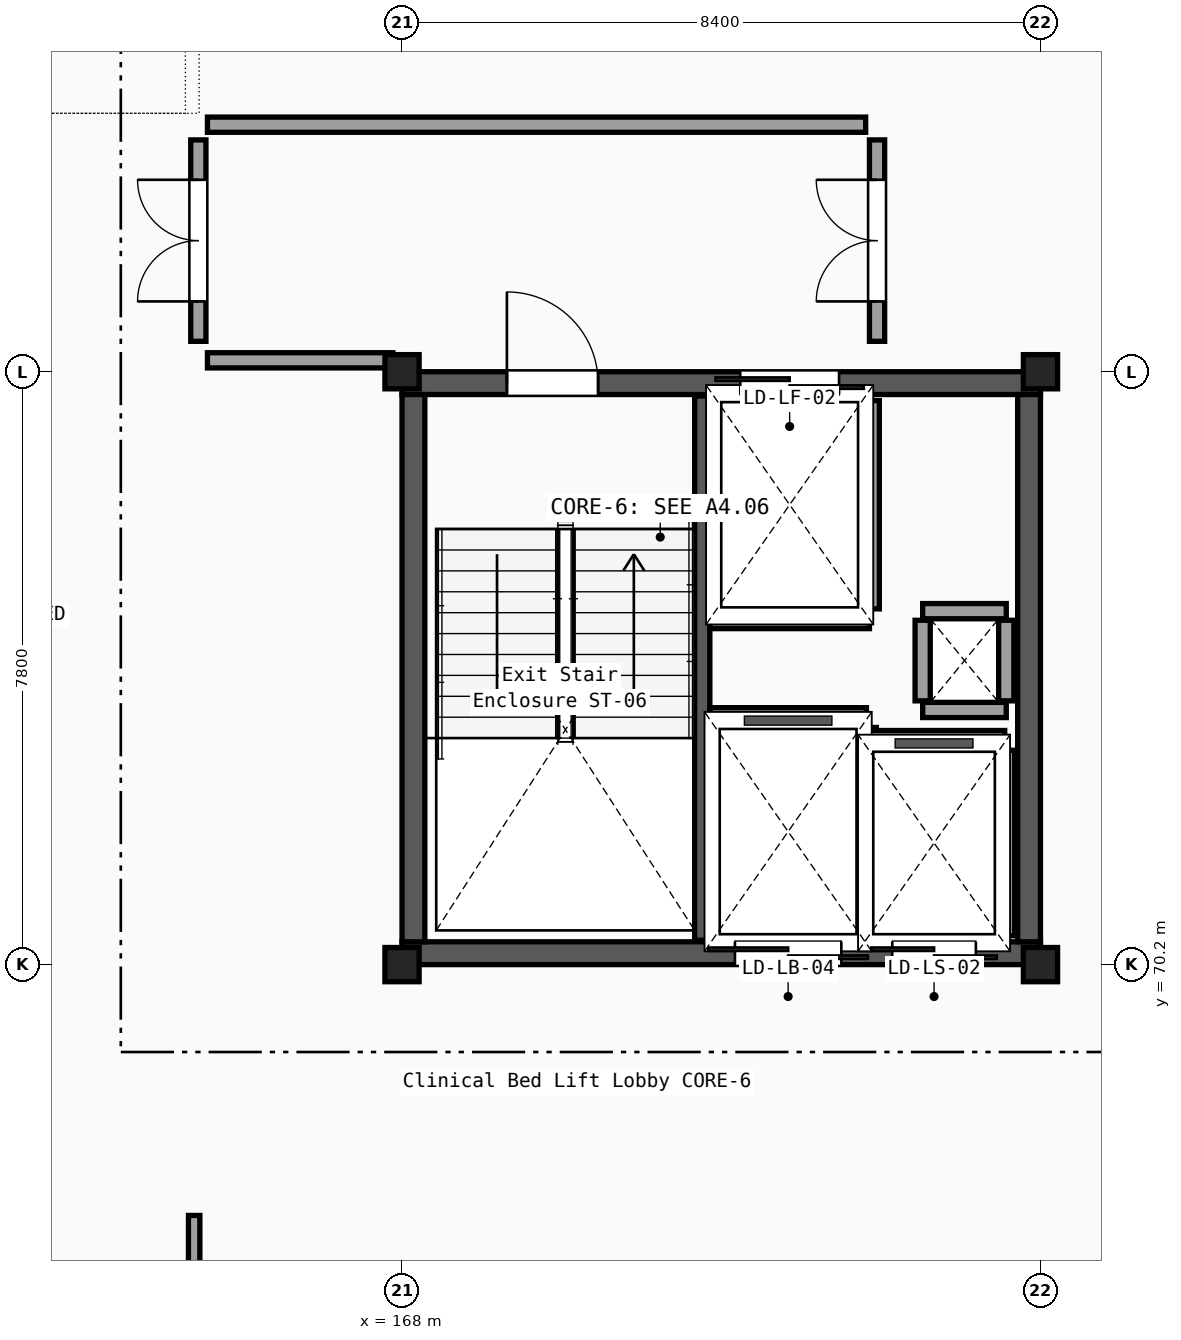
"""IFC4 building model, lengths in metres.
Left out: names, types, materials, properties, quantities, classifications, styles, units other than length and angle.
Written with IfcOpenShell. Run it as: python <this file> out.ifc"""

import sys

from ifc_helpers import new_model, si_unit, direction, frame, frame_2d, origin, origin_2d, place, context, subcontext, project, spatial, rectangle, i_section, extrude, element, fill, save


model = new_model("IFC4")
c1 = context("Model", 3, precision=1e-05, world=origin(), true_north=direction((0.0, 1.0)))
c2 = subcontext(c1, "Body", "Model", "MODEL_VIEW")
j1 = project(units=[si_unit("LENGTHUNIT", "METRE"), si_unit("PLANEANGLEUNIT", "RADIAN")], contexts=[c1])
p1 = place(None, origin())
s1 = spatial("IfcSite", under=j1, at=p1, CompositionType="ELEMENT")
p2 = place(p1, origin())
s2 = spatial("IfcBuilding", under=s1, at=p2, CompositionType="ELEMENT")
p3 = place(p2, frame((0.0, 0.0, 22.95)))
s3 = spatial("IfcBuildingStorey", under=s2, at=p3, CompositionType="ELEMENT", Elevation=22.95)
for number, where, z_axis, x_axis in (
    (1, (168.0, 70.2, 0.0), (0.0, 0.0, 1.0), (1.0, 0.0, 0.0)),
    (2, (168.0, 78.0, 0.0), (0.0, 0.0, 1.0), (1.0, 0.0, 0.0)),
    (3, (176.4, 70.2, 0.0), (0.0, 0.0, 1.0), (1.0, 0.0, 0.0)),
    (4, (176.4, 78.0, 0.0), (0.0, 0.0, 1.0), (1.0, 0.0, 0.0)),
):
    element("IfcColumn", number, at=place(p3, frame(where, z_axis=z_axis, x_axis=x_axis)), inside=s3, PredefinedType="COLUMN", context=c2, shape_type="SweptSolid", body=[
        extrude(i_section(OverallWidth=0.3, OverallDepth=0.45, WebThickness=0.014, FlangeThickness=0.026, FilletRadius=0.027, at=origin_2d()), origin(), (0.0, 0.0, 1.0), 4.05),
    ])
p4 = place(p3, frame((168.0, 70.35, 0.0), z_axis=(0.0, 0.0, 1.0), x_axis=(1.0, 0.0, 0.0)))
e5 = element("IfcWall", 5, at=p4, inside=s3, PredefinedType="SHEAR", context=c2, shape_type="SweptSolid", body=[
    extrude(rectangle(XDim=8.4, YDim=0.3, at=frame_2d((4.2, 0.0))), origin(), (0.0, 0.0, 1.0), 3.82),
])
p5 = place(p4, frame((4.38, 0.0, 0.0)))
e6 = element("IfcOpeningElement", 6, at=p5, cuts=e5, PredefinedType="OPENING", context=c2, shape_type="SweptSolid", body=[
    extrude(rectangle(XDim=1.4, YDim=2.2, at=frame_2d((0.7, 1.1))), frame((0.0, 0.16, 0.0), z_axis=(0.0, -1.0, 0.0), x_axis=(1.0, 0.0, 0.0)), (0.0, 0.0, 1.0), 0.32),
])
p6 = place(p4, frame((6.45, 0.0, 0.0)))
e7 = element("IfcOpeningElement", 7, at=p6, cuts=e5, PredefinedType="OPENING", context=c2, shape_type="SweptSolid", body=[
    extrude(rectangle(XDim=1.1, YDim=2.15, at=frame_2d((0.55, 1.075))), frame((0.0, 0.16, 0.0), z_axis=(0.0, -1.0, 0.0), x_axis=(1.0, 0.0, 0.0)), (0.0, 0.0, 1.0), 0.32),
])
p7 = place(p3, frame((168.0, 77.85, 0.0), z_axis=(0.0, 0.0, 1.0), x_axis=(1.0, 0.0, 0.0)))
e8 = element("IfcWall", 8, at=p7, inside=s3, PredefinedType="SHEAR", context=c2, shape_type="SweptSolid", body=[
    extrude(rectangle(XDim=8.4, YDim=0.3, at=frame_2d((4.2, 0.0))), origin(), (0.0, 0.0, 1.0), 3.82),
])
p8 = place(p7, frame((1.38, 0.0, 0.0)))
e9 = element("IfcOpeningElement", 9, at=p8, cuts=e8, PredefinedType="OPENING", context=c2, shape_type="SweptSolid", body=[
    extrude(rectangle(XDim=1.2, YDim=2.15, at=frame_2d((0.6, 1.075))), frame((0.0, 0.16, 0.0), z_axis=(0.0, -1.0, 0.0), x_axis=(1.0, 0.0, 0.0)), (0.0, 0.0, 1.0), 0.32),
])
p9 = place(p7, frame((4.45, 0.0, 0.0)))
e10 = element("IfcOpeningElement", 10, at=p9, cuts=e8, PredefinedType="OPENING", context=c2, shape_type="SweptSolid", body=[
    extrude(rectangle(XDim=1.3, YDim=2.2, at=frame_2d((0.65, 1.1))), frame((0.0, 0.16, 0.0), z_axis=(0.0, -1.0, 0.0), x_axis=(1.0, 0.0, 0.0)), (0.0, 0.0, 1.0), 0.32),
])
for number, where, z_axis, x_axis in (
    (11, (168.15, 70.5, 0.0), (0.0, 0.0, 1.0), (0.0, 1.0, 0.0)),
    (12, (176.25, 70.5, 0.0), (0.0, 0.0, 1.0), (0.0, 1.0, 0.0)),
):
    element("IfcWall", number, at=place(p3, frame(where, z_axis=z_axis, x_axis=x_axis)), inside=s3, PredefinedType="SHEAR", context=c2, shape_type="SweptSolid", body=[
        extrude(rectangle(XDim=7.2, YDim=0.3, at=frame_2d((3.6, 0.0))), origin(), (0.0, 0.0, 1.0), 3.82),
    ])
p10 = place(p3, frame((171.95, 70.52, 0.0), z_axis=(0.0, 0.0, 1.0), x_axis=(0.0, 1.0, 0.0)))
e13 = element("IfcWall", 13, at=p10, inside=s3, PredefinedType="SHEAR", context=c2, shape_type="SweptSolid", body=[
    extrude(rectangle(XDim=7.16, YDim=0.2, at=frame_2d((3.58, 0.0))), origin(), (0.0, 0.0, 1.0), 3.82),
])
for number, where, z_axis, x_axis in (
    (14, (174.85, 73.55, 0.0), (0.0, 0.0, 1.0), (1.0, 0.0, 0.0)),
    (15, (174.85, 74.85, 0.0), (0.0, 0.0, 1.0), (1.0, 0.0, 0.0)),
):
    element("IfcWall", number, at=place(p3, frame(where, z_axis=z_axis, x_axis=x_axis)), inside=s3, PredefinedType="PARTITIONING", context=c2, shape_type="SweptSolid", body=[
        extrude(rectangle(XDim=1.1, YDim=0.2, at=frame_2d((0.55, 0.0))), origin(), (0.0, 0.0, 1.0), 3.25),
    ])
for number, where, z_axis, x_axis in (
    (16, (174.85, 73.67, 0.0), (0.0, 0.0, 1.0), (0.0, 1.0, 0.0)),
    (17, (175.95, 73.67, 0.0), (0.0, 0.0, 1.0), (0.0, 1.0, 0.0)),
):
    element("IfcWall", number, at=place(p3, frame(where, z_axis=z_axis, x_axis=x_axis)), inside=s3, PredefinedType="PARTITIONING", context=c2, shape_type="SweptSolid", body=[
        extrude(rectangle(XDim=1.06, YDim=0.2, at=frame_2d((0.53, 0.0))), origin(), (0.0, 0.0, 1.0), 3.25),
    ])
p11 = place(p3, frame((174.18, 74.88, 0.0), z_axis=(0.0, 0.0, 1.0), x_axis=(0.0, 1.0, 0.0)))
e18 = element("IfcWall", 18, at=p11, inside=s3, PredefinedType="PARTITIONING", context=c2, shape_type="SweptSolid", body=[
    extrude(rectangle(XDim=2.74, YDim=0.2, at=frame_2d((1.37, 0.0))), origin(), (0.0, 0.0, 1.0), 3.25),
])
p12 = place(p3, frame((172.05, 74.72, 0.0), z_axis=(0.0, 0.0, 1.0), x_axis=(1.0, 0.0, 0.0)))
e19 = element("IfcWall", 19, at=p12, inside=s3, PredefinedType="PARTITIONING", context=c2, shape_type="SweptSolid", body=[
    extrude(rectangle(XDim=2.1, YDim=0.2, at=frame_2d((1.05, 0.0))), origin(), (0.0, 0.0, 1.0), 3.25),
])
p13 = place(p3, frame((174.14, 70.58, 0.0), z_axis=(0.0, 0.0, 1.0), x_axis=(0.0, 1.0, 0.0)))
e20 = element("IfcWall", 20, at=p13, inside=s3, PredefinedType="PARTITIONING", context=c2, shape_type="SweptSolid", body=[
    extrude(rectangle(XDim=2.74, YDim=0.2, at=frame_2d((1.37, 0.0))), origin(), (0.0, 0.0, 1.0), 3.25),
])
p14 = place(p3, frame((172.05, 73.48, 0.0), z_axis=(0.0, 0.0, 1.0), x_axis=(1.0, 0.0, 0.0)))
e21 = element("IfcWall", 21, at=p14, inside=s3, PredefinedType="PARTITIONING", context=c2, shape_type="SweptSolid", body=[
    extrude(rectangle(XDim=2.06, YDim=0.2, at=frame_2d((1.03, 0.0))), origin(), (0.0, 0.0, 1.0), 3.25),
])
p15 = place(p3, frame((175.96, 70.58, 0.0), z_axis=(0.0, 0.0, 1.0), x_axis=(0.0, 1.0, 0.0)))
e22 = element("IfcWall", 22, at=p15, inside=s3, PredefinedType="PARTITIONING", context=c2, shape_type="SweptSolid", body=[
    extrude(rectangle(XDim=2.44, YDim=0.2, at=frame_2d((1.22, 0.0))), origin(), (0.0, 0.0, 1.0), 3.25),
])
p16 = place(p3, frame((174.07, 73.18, 0.0), z_axis=(0.0, 0.0, 1.0), x_axis=(1.0, 0.0, 0.0)))
e23 = element("IfcWall", 23, at=p16, inside=s3, PredefinedType="PARTITIONING", context=c2, shape_type="SweptSolid", body=[
    extrude(rectangle(XDim=1.86, YDim=0.2, at=frame_2d((0.93, 0.0))), origin(), (0.0, 0.0, 1.0), 3.25),
])
p17 = place(p3, frame((165.44, 78.15, 0.0), z_axis=(0.0, 0.0, 1.0), x_axis=(1.0, 0.0, 0.0)))
e24 = element("IfcWall", 24, at=p17, inside=s3, PredefinedType="PARTITIONING", context=c2, shape_type="SweptSolid", body=[
    extrude(rectangle(XDim=2.44, YDim=0.2, at=frame_2d((1.22, 0.0))), origin(), (0.0, 0.0, 1.0), 3.25),
])
p18 = place(p3, frame((165.44, 81.25, 0.0), z_axis=(0.0, 0.0, 1.0), x_axis=(1.0, 0.0, 0.0)))
e25 = element("IfcWall", 25, at=p18, inside=s3, PredefinedType="PARTITIONING", context=c2, shape_type="SweptSolid", body=[
    extrude(rectangle(XDim=8.66, YDim=0.2, at=frame_2d((4.33, 0.0))), origin(), (0.0, 0.0, 1.0), 3.25),
])
p19 = place(p3, frame((165.32, 78.4, 0.0), z_axis=(0.0, 0.0, 1.0), x_axis=(0.0, 1.0, 0.0)))
e26 = element("IfcWall", 26, at=p19, inside=s3, PredefinedType="PARTITIONING", context=c2, shape_type="SweptSolid", body=[
    extrude(rectangle(XDim=2.65, YDim=0.2, at=frame_2d((1.325, 0.0))), origin(), (0.0, 0.0, 1.0), 3.25),
])
p20 = place(p19, frame((0.525, 0.0, 0.0)))
e27 = element("IfcOpeningElement", 27, at=p20, cuts=e26, PredefinedType="OPENING", context=c2, shape_type="SweptSolid", body=[
    extrude(rectangle(XDim=1.6, YDim=2.2, at=frame_2d((0.8, 1.1))), frame((0.0, 0.11, 0.0), z_axis=(0.0, -1.0, 0.0), x_axis=(1.0, 0.0, 0.0)), (0.0, 0.0, 1.0), 0.22),
])
p21 = place(p3, frame((174.25, 78.4, 0.0), z_axis=(0.0, 0.0, 1.0), x_axis=(0.0, 1.0, 0.0)))
e28 = element("IfcWall", 28, at=p21, inside=s3, PredefinedType="PARTITIONING", context=c2, shape_type="SweptSolid", body=[
    extrude(rectangle(XDim=2.65, YDim=0.2, at=frame_2d((1.325, 0.0))), origin(), (0.0, 0.0, 1.0), 3.25),
])
p22 = place(p21, frame((0.525, 0.0, 0.0)))
e29 = element("IfcOpeningElement", 29, at=p22, cuts=e28, PredefinedType="OPENING", context=c2, shape_type="SweptSolid", body=[
    extrude(rectangle(XDim=1.6, YDim=2.2, at=frame_2d((0.8, 1.1))), frame((0.0, 0.11, 0.0), z_axis=(0.0, -1.0, 0.0), x_axis=(1.0, 0.0, 0.0)), (0.0, 0.0, 1.0), 0.22),
])
p23 = place(p3, frame((165.265, 58.25, 0.0), z_axis=(0.0, 0.0, 1.0), x_axis=(0.0, 1.0, 0.0)))
e30 = element("IfcWall", 30, at=p23, inside=s3, PredefinedType="PARTITIONING", context=c2, shape_type="SweptSolid", body=[
    extrude(rectangle(XDim=8.65, YDim=0.15, at=frame_2d((4.325, 0.0))), origin(), (0.0, 0.0, 1.0), 3.25),
])
p24 = place(p23, frame((3.8, 0.0, 0.0)))
e31 = element("IfcOpeningElement", 31, at=p24, cuts=e30, PredefinedType="OPENING", context=c2, shape_type="SweptSolid", body=[
    extrude(rectangle(XDim=1.05, YDim=2.15, at=frame_2d((0.525, 1.075))), frame((0.0, 0.085, 0.0), z_axis=(0.0, -1.0, 0.0), x_axis=(1.0, 0.0, 0.0)), (0.0, 0.0, 1.0), 0.17),
])
p25 = place(p8, origin())
e32 = element("IfcDoor", 32, at=p25, inside=s3, OperationType="SINGLE_SWING_LEFT", PredefinedType="DOOR", context=c2, shape_type="SweptSolid", body=[
    extrude(rectangle(XDim=1.2, YDim=2.15, at=frame_2d((0.6, 1.075))), frame((0.0, 0.025, 0.0), z_axis=(0.0, -1.0, 0.0), x_axis=(1.0, 0.0, 0.0)), (0.0, 0.0, 1.0), 0.05),
])
fill(e9, e32)
p26 = place(p9, origin())
e33 = element("IfcDoor", 33, at=p26, inside=s3, OperationType="DOUBLE_DOOR_SLIDING", PredefinedType="DOOR", context=c2, shape_type="SweptSolid", body=[
    extrude(rectangle(XDim=1.3, YDim=2.2, at=frame_2d((0.65, 1.1))), frame((0.0, 0.025, 0.0), z_axis=(0.0, -1.0, 0.0), x_axis=(1.0, 0.0, 0.0)), (0.0, 0.0, 1.0), 0.05),
])
fill(e10, e33)
p27 = place(p5, origin())
e34 = element("IfcDoor", 34, at=p27, inside=s3, OperationType="DOUBLE_DOOR_SLIDING", PredefinedType="DOOR", context=c2, shape_type="SweptSolid", body=[
    extrude(rectangle(XDim=1.4, YDim=2.2, at=frame_2d((0.7, 1.1))), frame((0.0, 0.025, 0.0), z_axis=(0.0, -1.0, 0.0), x_axis=(1.0, 0.0, 0.0)), (0.0, 0.0, 1.0), 0.05),
])
fill(e6, e34)
p28 = place(p6, origin())
e35 = element("IfcDoor", 35, at=p28, inside=s3, OperationType="DOUBLE_DOOR_SLIDING", PredefinedType="DOOR", context=c2, shape_type="SweptSolid", body=[
    extrude(rectangle(XDim=1.1, YDim=2.15, at=frame_2d((0.55, 1.075))), frame((0.0, 0.025, 0.0), z_axis=(0.0, -1.0, 0.0), x_axis=(1.0, 0.0, 0.0)), (0.0, 0.0, 1.0), 0.05),
])
fill(e7, e35)
p29 = place(p20, origin())
e36 = element("IfcDoor", 36, at=p29, inside=s3, OperationType="DOUBLE_DOOR_SINGLE_SWING", PredefinedType="DOOR", context=c2, shape_type="SweptSolid", body=[
    extrude(rectangle(XDim=1.6, YDim=2.2, at=frame_2d((0.8, 1.1))), frame((0.0, 0.025, 0.0), z_axis=(0.0, -1.0, 0.0), x_axis=(1.0, 0.0, 0.0)), (0.0, 0.0, 1.0), 0.05),
])
fill(e27, e36)
p30 = place(p22, origin())
e37 = element("IfcDoor", 37, at=p30, inside=s3, OperationType="DOUBLE_DOOR_SINGLE_SWING", PredefinedType="DOOR", context=c2, shape_type="SweptSolid", body=[
    extrude(rectangle(XDim=1.6, YDim=2.2, at=frame_2d((0.8, 1.1))), frame((0.0, 0.025, 0.0), z_axis=(0.0, -1.0, 0.0), x_axis=(1.0, 0.0, 0.0)), (0.0, 0.0, 1.0), 0.05),
])
fill(e29, e37)
save(model, sys.argv[1])
